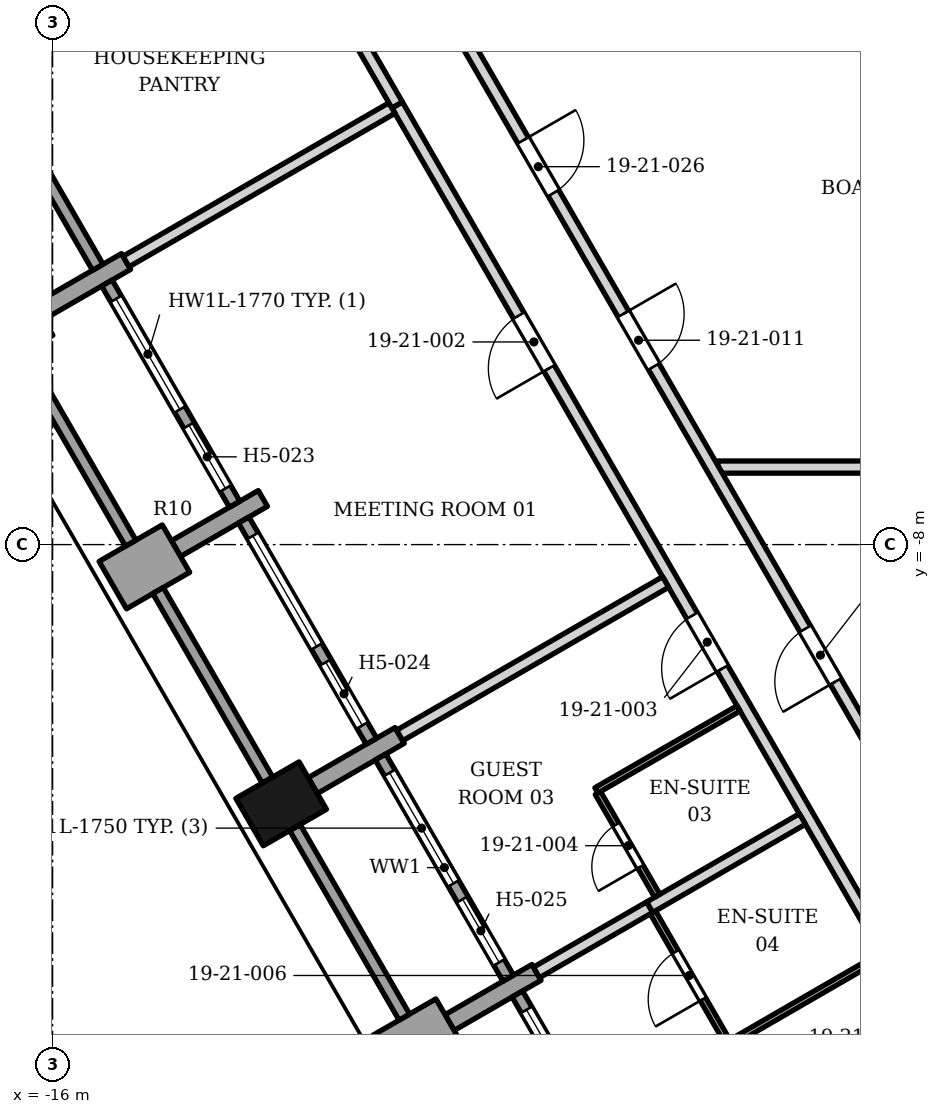
"""IFC4 building model, lengths in metres.
Left out: names, types, materials, properties, quantities, classifications, styles, units other than length and angle.
Written with IfcOpenShell. Run it as: python <this file> out.ifc"""

import sys

from ifc_helpers import new_model, si_unit, direction, frame, frame_2d, origin, origin_2d, place, context, subcontext, project, spatial, rectangle, extrude, element, fill, save


model = new_model("IFC4")
c1 = context("Model", 3, precision=1e-05, world=origin(), true_north=direction((0.0, 1.0)))
c2 = subcontext(c1, "Body", "Model", "MODEL_VIEW")
j1 = project(units=[si_unit("LENGTHUNIT", "METRE"), si_unit("PLANEANGLEUNIT", "RADIAN")], contexts=[c1])
p1 = place(None, origin())
s1 = spatial("IfcSite", under=j1, at=p1, CompositionType="ELEMENT")
p2 = place(p1, origin())
s2 = spatial("IfcBuilding", under=s1, at=p2, CompositionType="ELEMENT")
p3 = place(p2, frame((0.0, 0.0, 91.8)))
s3 = spatial("IfcBuildingStorey", under=s2, at=p3, CompositionType="ELEMENT", Elevation=91.8)
for number, where, z_axis, x_axis in (
    (1, (-16.741, -4.469, 0.0), (0.0, 0.0, 1.0), (0.5, -0.866, 0.0)),
    (2, (-12.241, -12.263, 0.0), (0.0, 0.0, 1.0), (0.5, -0.866, 0.0)),
):
    element("IfcColumn", number, at=place(p3, frame(where, z_axis=z_axis, x_axis=x_axis)), inside=s3, PredefinedType="COLUMN", context=c2, shape_type="SweptSolid", body=[
        extrude(rectangle(XDim=0.9, YDim=1.2, at=origin_2d()), origin(), (0.0, 0.0, 1.0), 3.4),
    ])
p4 = place(p3, frame((-16.221, -4.169, 0.0), z_axis=(0.0, 0.0, 1.0), x_axis=(0.865976140824, 0.500085316245, 0.0)))
e3 = element("IfcWall", 3, at=p4, inside=s3, PredefinedType="SOLIDWALL", context=c2, shape_type="SweptSolid", body=[
    extrude(rectangle(XDim=1.65, YDim=0.3, at=frame_2d((0.825, 0.0))), origin(), (0.0, 0.0, 1.0), 2.65),
])
p5 = place(p3, frame((-13.971, -8.066, 0.0), z_axis=(0.0, 0.0, 1.0), x_axis=(-0.865955154139, -0.50012165622, 0.0)))
e4 = element("IfcWall", 4, at=p5, inside=s3, PredefinedType="SOLIDWALL", context=c2, shape_type="SweptSolid", body=[
    extrude(rectangle(XDim=1.2, YDim=0.9, at=frame_2d((0.6, 0.0))), origin(), (0.0, 0.0, 1.0), 2.63),
])
p6 = place(p3, frame((-13.971, -8.066, 0.0), z_axis=(0.0, 0.0, 1.0), x_axis=(0.866040211805, 0.499974350878, 0.0)))
e5 = element("IfcWall", 5, at=p6, inside=s3, PredefinedType="SOLIDWALL", context=c2, shape_type="SweptSolid", body=[
    extrude(rectangle(XDim=1.65, YDim=0.3, at=frame_2d((0.825, 0.0))), origin(), (0.0, 0.0, 1.0), 2.473),
])
p7 = place(p3, frame((-11.721, -11.963, 0.0), z_axis=(0.0, 0.0, 1.0), x_axis=(0.866040211805, 0.499974350878, 0.0)))
e6 = element("IfcWall", 6, at=p7, inside=s3, PredefinedType="SOLIDWALL", context=c2, shape_type="SweptSolid", body=[
    extrude(rectangle(XDim=1.65, YDim=0.3, at=frame_2d((0.825, 0.0))), origin(), (0.0, 0.0, 1.0), 2.45),
])
p8 = place(p3, frame((-10.51, -16.46, 0.0), z_axis=(0.0, 0.0, 1.0), x_axis=(0.865955154139, 0.50012165622, 0.0)))
e7 = element("IfcWall", 7, at=p8, inside=s3, PredefinedType="SOLIDWALL", context=c2, shape_type="SweptSolid", body=[
    extrude(rectangle(XDim=1.2, YDim=0.9, at=frame_2d((0.6, 0.0))), origin(), (0.0, 0.0, 1.0), 2.63),
])
p9 = place(p3, frame((-8.042, -15.035, 0.0), z_axis=(0.0, 0.0, 1.0), x_axis=(-0.866040211805, -0.499974350878, 0.0)))
e8 = element("IfcWall", 8, at=p9, inside=s3, PredefinedType="SOLIDWALL", context=c2, shape_type="SweptSolid", body=[
    extrude(rectangle(XDim=1.65, YDim=0.3, at=frame_2d((0.825, 0.0))), origin(), (0.0, 0.0, 1.0), 2.65),
])
p10 = place(p3, frame((-17.357, 0.198, 0.0), z_axis=(0.0, 0.0, 1.0), x_axis=(0.500027713859, -0.866009402589, 0.0)))
e9 = element("IfcWall", 9, at=p10, inside=s3, PredefinedType="ELEMENTEDWALL", context=c2, shape_type="SweptSolid", body=[
    extrude(rectangle(XDim=4.2, YDim=0.2, at=frame_2d((2.1, 0.0))), origin(), (0.0, 0.0, 1.0), 2.65),
])
p11 = place(p3, frame((-16.516, -4.859, 0.0), z_axis=(0.0, 0.0, 1.0), x_axis=(0.499961193289, -0.866047807691, 0.0)))
e10 = element("IfcWall", 10, at=p11, inside=s3, PredefinedType="SOLIDWALL", context=c2, shape_type="SweptSolid", body=[
    extrude(rectangle(XDim=3.6, YDim=0.2, at=frame_2d((1.8, 0.0))), origin(), (0.0, 0.0, 1.0), 2.63),
])
p12 = place(p3, frame((-15.107, -3.699, 0.0), z_axis=(0.0, 0.0, 1.0), x_axis=(0.500002543286, -0.866023935413, 0.0)))
e11 = element("IfcWall", 11, at=p12, inside=s3, PredefinedType="ELEMENTEDWALL", context=c2, shape_type="SweptSolid", body=[
    extrude(rectangle(XDim=4.2, YDim=0.2, at=frame_2d((2.1, 0.0))), origin(), (0.0, 0.0, 1.0), 2.473),
])
p13 = place(p12, frame((0.3, 0.0, 0.6)))
e12 = element("IfcOpeningElement", 12, at=p13, cuts=e11, PredefinedType="OPENING", context=c2, shape_type="SweptSolid", body=[
    extrude(rectangle(XDim=2.1, YDim=1.77, at=frame_2d((1.05, 0.885))), frame((0.0, 0.11, 0.0), z_axis=(0.0, -1.0, 0.0), x_axis=(1.0, 0.0, 0.0)), (0.0, 0.0, 1.0), 0.22),
])
p14 = place(p12, frame((2.7, 0.0, 0.0)))
e13 = element("IfcOpeningElement", 13, at=p14, cuts=e11, PredefinedType="OPENING", context=c2, shape_type="SweptSolid", body=[
    extrude(rectangle(XDim=1.2, YDim=2.37, at=frame_2d((0.6, 1.185))), frame((0.0, 0.11, 0.0), z_axis=(0.0, -1.0, 0.0), x_axis=(1.0, 0.0, 0.0)), (0.0, 0.0, 1.0), 0.22),
])
p15 = place(p3, frame((-14.266, -8.756, 0.0), z_axis=(0.0, 0.0, 1.0), x_axis=(0.499961193289, -0.866047807691, 0.0)))
e14 = element("IfcWall", 14, at=p15, inside=s3, PredefinedType="SOLIDWALL", context=c2, shape_type="SweptSolid", body=[
    extrude(rectangle(XDim=3.6, YDim=0.2, at=frame_2d((1.8, 0.0))), origin(), (0.0, 0.0, 1.0), 2.473),
])
p16 = place(p3, frame((-12.857, -7.596, 0.0), z_axis=(0.0, 0.0, 1.0), x_axis=(0.500027713859, -0.866009402589, 0.0)))
e15 = element("IfcWall", 15, at=p16, inside=s3, PredefinedType="ELEMENTEDWALL", context=c2, shape_type="SweptSolid", body=[
    extrude(rectangle(XDim=4.2, YDim=0.2, at=frame_2d((2.1, 0.0))), origin(), (0.0, 0.0, 1.0), 2.65),
])
p17 = place(p16, frame((0.3, 0.0, 0.6)))
e16 = element("IfcOpeningElement", 16, at=p17, cuts=e15, PredefinedType="OPENING", context=c2, shape_type="SweptSolid", body=[
    extrude(rectangle(XDim=2.1, YDim=1.8, at=frame_2d((1.05, 0.9))), frame((0.0, 0.11, 0.0), z_axis=(0.0, -1.0, 0.0), x_axis=(1.0, 0.0, 0.0)), (0.0, 0.0, 1.0), 0.22),
])
p18 = place(p16, frame((2.7, 0.0, 0.0)))
e17 = element("IfcOpeningElement", 17, at=p18, cuts=e15, PredefinedType="OPENING", context=c2, shape_type="SweptSolid", body=[
    extrude(rectangle(XDim=1.2, YDim=2.4, at=frame_2d((0.6, 1.2))), frame((0.0, 0.11, 0.0), z_axis=(0.0, -1.0, 0.0), x_axis=(1.0, 0.0, 0.0)), (0.0, 0.0, 1.0), 0.22),
])
p19 = place(p3, frame((-12.016, -12.653, 0.0), z_axis=(0.0, 0.0, 1.0), x_axis=(0.499961193289, -0.866047807691, 0.0)))
e18 = element("IfcWall", 18, at=p19, inside=s3, PredefinedType="SOLIDWALL", context=c2, shape_type="SweptSolid", body=[
    extrude(rectangle(XDim=3.6, YDim=0.2, at=frame_2d((1.8, 0.0))), origin(), (0.0, 0.0, 1.0), 2.63),
])
p20 = place(p3, frame((-10.607, -11.493, 0.0), z_axis=(0.0, 0.0, 1.0), x_axis=(0.500002543286, -0.866023935413, 0.0)))
e19 = element("IfcWall", 19, at=p20, inside=s3, PredefinedType="ELEMENTEDWALL", context=c2, shape_type="SweptSolid", body=[
    extrude(rectangle(XDim=4.2, YDim=0.2, at=frame_2d((2.1, 0.0))), origin(), (0.0, 0.0, 1.0), 2.45),
])
p21 = place(p20, frame((0.3, 0.0, 0.6)))
e20 = element("IfcOpeningElement", 20, at=p21, cuts=e19, PredefinedType="OPENING", context=c2, shape_type="SweptSolid", body=[
    extrude(rectangle(XDim=2.1, YDim=1.75, at=frame_2d((1.05, 0.875))), frame((0.0, 0.11, 0.0), z_axis=(0.0, -1.0, 0.0), x_axis=(1.0, 0.0, 0.0)), (0.0, 0.0, 1.0), 0.22),
])
p22 = place(p20, frame((2.7, 0.0, 0.0)))
e21 = element("IfcOpeningElement", 21, at=p22, cuts=e19, PredefinedType="OPENING", context=c2, shape_type="SweptSolid", body=[
    extrude(rectangle(XDim=1.2, YDim=2.35, at=frame_2d((0.6, 1.175))), frame((0.0, 0.11, 0.0), z_axis=(0.0, -1.0, 0.0), x_axis=(1.0, 0.0, 0.0)), (0.0, 0.0, 1.0), 0.22),
])
p23 = place(p3, frame((-8.357, -15.39, 0.0), z_axis=(0.0, 0.0, 1.0), x_axis=(0.500027713859, -0.866009402589, 0.0)))
e22 = element("IfcWall", 22, at=p23, inside=s3, PredefinedType="ELEMENTEDWALL", context=c2, shape_type="SweptSolid", body=[
    extrude(rectangle(XDim=4.2, YDim=0.2, at=frame_2d((2.1, 0.0))), origin(), (0.0, 0.0, 1.0), 2.65),
])
p24 = place(p23, frame((0.3, 0.0, 0.6)))
e23 = element("IfcOpeningElement", 23, at=p24, cuts=e22, PredefinedType="OPENING", context=c2, shape_type="SweptSolid", body=[
    extrude(rectangle(XDim=2.1, YDim=1.8, at=frame_2d((1.05, 0.9))), frame((0.0, 0.11, 0.0), z_axis=(0.0, -1.0, 0.0), x_axis=(1.0, 0.0, 0.0)), (0.0, 0.0, 1.0), 0.22),
])
p25 = place(p23, frame((2.7, 0.0, 0.0)))
e24 = element("IfcOpeningElement", 24, at=p25, cuts=e22, PredefinedType="OPENING", context=c2, shape_type="SweptSolid", body=[
    extrude(rectangle(XDim=1.2, YDim=2.4, at=frame_2d((0.6, 1.2))), frame((0.0, 0.11, 0.0), z_axis=(0.0, -1.0, 0.0), x_axis=(1.0, 0.0, 0.0)), (0.0, 0.0, 1.0), 0.22),
])
p26 = place(p3, frame((-10.334, -0.77, 0.0), z_axis=(0.0, 0.0, 1.0), x_axis=(0.499996405163, -0.866027479255, 0.0)))
e25 = element("IfcWall", 25, at=p26, inside=s3, PredefinedType="PARTITIONING", context=c2, shape_type="SweptSolid", body=[
    extrude(rectangle(XDim=20.803, YDim=0.2, at=frame_2d((10.401, 0.0))), origin(), (0.0, 0.0, 1.0), 2.384),
])
p27 = place(p26, frame((4.0, 0.0, 0.0)))
e26 = element("IfcOpeningElement", 26, at=p27, cuts=e25, PredefinedType="OPENING", context=c2, shape_type="SweptSolid", body=[
    extrude(rectangle(XDim=1.0, YDim=2.1, at=frame_2d((0.5, 1.05))), frame((0.0, 0.11, 0.0), z_axis=(0.0, -1.0, 0.0), x_axis=(1.0, 0.0, 0.0)), (0.0, 0.0, 1.0), 0.22),
])
p28 = place(p26, frame((9.7, 0.0, 0.0)))
e27 = element("IfcOpeningElement", 27, at=p28, cuts=e25, PredefinedType="OPENING", context=c2, shape_type="SweptSolid", body=[
    extrude(rectangle(XDim=1.0, YDim=2.1, at=frame_2d((0.5, 1.05))), frame((0.0, 0.11, 0.0), z_axis=(0.0, -1.0, 0.0), x_axis=(1.0, 0.0, 0.0)), (0.0, 0.0, 1.0), 0.22),
])
p29 = place(p26, frame((16.6, 0.0, 0.0)))
e28 = element("IfcOpeningElement", 28, at=p29, cuts=e25, PredefinedType="OPENING", context=c2, shape_type="SweptSolid", body=[
    extrude(rectangle(XDim=1.1, YDim=2.1, at=frame_2d((0.55, 1.05))), frame((0.0, 0.11, 0.0), z_axis=(0.0, -1.0, 0.0), x_axis=(1.0, 0.0, 0.0)), (0.0, 0.0, 1.0), 0.22),
])
p30 = place(p26, frame((18.852, 0.0, 0.0)))
e29 = element("IfcOpeningElement", 29, at=p30, cuts=e25, PredefinedType="OPENING", context=c2, shape_type="SweptSolid", body=[
    extrude(rectangle(XDim=1.1, YDim=2.1, at=frame_2d((0.55, 1.05))), frame((0.0, 0.11, 0.0), z_axis=(0.0, -1.0, 0.0), x_axis=(1.0, 0.0, 0.0)), (0.0, 0.0, 1.0), 0.22),
])
p31 = place(p3, frame((-4.88, -16.212, 0.0), z_axis=(0.0, 0.0, 1.0), x_axis=(0.865729701078, 0.500511822708, 0.0)))
e30 = element("IfcWall", 30, at=p31, inside=s3, PredefinedType="PARTITIONING", context=c2, shape_type="SweptSolid", body=[
    extrude(rectangle(XDim=2.9, YDim=0.1, at=frame_2d((1.45, 0.0))), origin(), (0.0, 0.0, 1.0), 2.628),
])
p32 = place(p3, frame((-6.129, -14.046, 0.0), z_axis=(0.0, 0.0, 1.0), x_axis=(0.499408942836, -0.866366381974, 0.0)))
e31 = element("IfcWall", 31, at=p32, inside=s3, PredefinedType="PARTITIONING", context=c2, shape_type="SweptSolid", body=[
    extrude(rectangle(XDim=2.45, YDim=0.1, at=frame_2d((1.225, 0.0))), origin(), (0.0, 0.0, 1.0), 3.23),
])
p33 = place(p32, frame((0.75, 0.0, 0.0)))
e32 = element("IfcOpeningElement", 32, at=p33, cuts=e31, PredefinedType="OPENING", context=c2, shape_type="SweptSolid", body=[
    extrude(rectangle(XDim=0.9, YDim=2.1, at=frame_2d((0.45, 1.05))), frame((0.0, 0.06, 0.0), z_axis=(0.0, -1.0, 0.0), x_axis=(1.0, 0.0, 0.0)), (0.0, 0.0, 1.0), 0.12),
])
p34 = place(p3, frame((-8.042, -15.036, 0.0), z_axis=(0.0, 0.0, 1.0), x_axis=(0.866448284977, 0.499266831925, 0.0)))
e33 = element("IfcWall", 33, at=p34, inside=s3, PredefinedType="PARTITIONING", context=c2, shape_type="SweptSolid", body=[
    extrude(rectangle(XDim=2.15, YDim=0.2, at=frame_2d((1.075, 0.0))), origin(), (0.0, 0.0, 1.0), 3.23),
])
p35 = place(p3, frame((-6.179, -13.962, 0.0), z_axis=(0.0, 0.0, 1.0), x_axis=(0.866011727401, 0.500023687443, 0.0)))
e34 = element("IfcWall", 34, at=p35, inside=s3, PredefinedType="PARTITIONING", context=c2, shape_type="SweptSolid", body=[
    extrude(rectangle(XDim=2.9, YDim=0.2, at=frame_2d((1.45, 0.0))), origin(), (0.0, 0.0, 1.0), 2.628),
])
p36 = place(p3, frame((-7.032, -12.085, 0.0), z_axis=(0.0, 0.0, 1.0), x_axis=(0.500098182527, -0.865968710655, 0.0)))
e35 = element("IfcWall", 35, at=p36, inside=s3, PredefinedType="PARTITIONING", context=c2, shape_type="SweptSolid", body=[
    extrude(rectangle(XDim=1.95, YDim=0.1, at=frame_2d((0.975, 0.0))), origin(), (0.0, 0.0, 1.0), 2.45),
])
p37 = place(p36, frame((0.6, 0.0, 0.0)))
e36 = element("IfcOpeningElement", 36, at=p37, cuts=e35, PredefinedType="OPENING", context=c2, shape_type="SweptSolid", body=[
    extrude(rectangle(XDim=0.8, YDim=2.1, at=frame_2d((0.4, 1.05))), frame((0.0, 0.06, 0.0), z_axis=(0.0, -1.0, 0.0), x_axis=(1.0, 0.0, 0.0)), (0.0, 0.0, 1.0), 0.12),
])
p38 = place(p3, frame((-7.057, -12.042, 0.0), z_axis=(0.0, 0.0, 1.0), x_axis=(0.866339109022, 0.499456252518, 0.0)))
e37 = element("IfcWall", 37, at=p38, inside=s3, PredefinedType="PARTITIONING", context=c2, shape_type="SweptSolid", body=[
    extrude(rectangle(XDim=2.7, YDim=0.1, at=frame_2d((1.35, 0.0))), origin(), (0.0, 0.0, 1.0), 2.45),
])
p39 = place(p3, frame((-10.292, -11.138, 0.0), z_axis=(0.0, 0.0, 1.0), x_axis=(0.866188805601, 0.49971687289, 0.0)))
e38 = element("IfcWall", 38, at=p39, inside=s3, PredefinedType="PARTITIONING", context=c2, shape_type="SweptSolid", body=[
    extrude(rectangle(XDim=5.05, YDim=0.2, at=frame_2d((2.525, 0.0))), origin(), (0.0, 0.0, 1.0), 2.552),
])
p40 = place(p3, frame((-5.061, -6.725, 0.0), z_axis=(0.0, 0.0, 1.0), x_axis=(1.0, 0.0, 0.0)))
e39 = element("IfcWall", 39, at=p40, inside=s3, PredefinedType="PARTITIONING", context=c2, shape_type="SweptSolid", body=[
    extrude(rectangle(XDim=10.261, YDim=0.2, at=frame_2d((5.13, 0.0))), origin(), (0.0, 0.0, 1.0), 2.384),
])
p41 = place(p3, frame((-14.792, -3.344, 0.0), z_axis=(0.0, 0.0, 1.0), x_axis=(0.866188805601, 0.49971687289, 0.0)))
e40 = element("IfcWall", 40, at=p41, inside=s3, PredefinedType="PARTITIONING", context=c2, shape_type="SweptSolid", body=[
    extrude(rectangle(XDim=5.05, YDim=0.2, at=frame_2d((2.525, 0.0))), origin(), (0.0, 0.0, 1.0), 2.473),
])
p42 = place(p3, frame((-12.534, 3.04, 0.0), z_axis=(0.0, 0.0, 1.0), x_axis=(0.50001224981, -0.866018331238, 0.0)))
e41 = element("IfcWall", 41, at=p42, inside=s3, PredefinedType="PARTITIONING", context=c2, shape_type="SweptSolid", body=[
    extrude(rectangle(XDim=4.4, YDim=0.2, at=frame_2d((2.2, 0.0))), origin(), (0.0, 0.0, 1.0), 3.23),
])
p43 = place(p42, frame((1.7, 0.0, 0.0)))
e42 = element("IfcOpeningElement", 42, at=p43, cuts=e41, PredefinedType="OPENING", context=c2, shape_type="SweptSolid", body=[
    extrude(rectangle(XDim=0.9, YDim=2.1, at=frame_2d((0.45, 1.05))), frame((0.0, 0.11, 0.0), z_axis=(0.0, -1.0, 0.0), x_axis=(1.0, 0.0, 0.0)), (0.0, 0.0, 1.0), 0.22),
])
p44 = place(p3, frame((-11.18, 3.7, 0.0), z_axis=(0.0, 0.0, 1.0), x_axis=(0.500129162475, -0.865950818951, 0.0)))
e43 = element("IfcWall", 43, at=p44, inside=s3, PredefinedType="PARTITIONING", context=c2, shape_type="SweptSolid", body=[
    extrude(rectangle(XDim=22.499, YDim=0.2, at=frame_2d((11.249, 0.0))), origin(), (0.0, 0.0, 1.0), 2.384),
])
p45 = place(p44, frame((9.13, 0.0, 0.0)))
e44 = element("IfcOpeningElement", 44, at=p45, cuts=e43, PredefinedType="OPENING", context=c2, shape_type="SweptSolid", body=[
    extrude(rectangle(XDim=1.0, YDim=2.1, at=frame_2d((0.5, 1.05))), frame((0.0, 0.11, 0.0), z_axis=(0.0, -1.0, 0.0), x_axis=(1.0, 0.0, 0.0)), (0.0, 0.0, 1.0), 0.22),
])
p46 = place(p44, frame((15.111, 0.0, 0.0)))
e45 = element("IfcOpeningElement", 45, at=p46, cuts=e43, PredefinedType="OPENING", context=c2, shape_type="SweptSolid", body=[
    extrude(rectangle(XDim=1.0, YDim=2.1, at=frame_2d((0.5, 1.05))), frame((0.0, 0.11, 0.0), z_axis=(0.0, -1.0, 0.0), x_axis=(1.0, 0.0, 0.0)), (0.0, 0.0, 1.0), 0.22),
])
p47 = place(p44, frame((5.834, 0.0, 0.0)))
e46 = element("IfcOpeningElement", 46, at=p47, cuts=e43, PredefinedType="OPENING", context=c2, shape_type="SweptSolid", body=[
    extrude(rectangle(XDim=1.0, YDim=2.1, at=frame_2d((0.5, 1.05))), frame((0.0, 0.11, 0.0), z_axis=(0.0, -1.0, 0.0), x_axis=(1.0, 0.0, 0.0)), (0.0, 0.0, 1.0), 0.22),
])
p48 = place(p13, origin())
e47 = element("IfcWindow", 47, at=p48, inside=s3, PartitioningType="SINGLE_PANEL", PredefinedType="WINDOW", context=c2, shape_type="SweptSolid", body=[
    extrude(rectangle(XDim=2.1, YDim=1.77, at=frame_2d((1.05, 0.885))), frame((0.0, 0.03, 0.0), z_axis=(0.0, -1.0, 0.0), x_axis=(1.0, 0.0, 0.0)), (0.0, 0.0, 1.0), 0.06),
])
fill(e12, e47)
p49 = place(p14, origin())
e48 = element("IfcDoor", 48, at=p49, inside=s3, OperationType="SINGLE_SWING_LEFT", PredefinedType="DOOR", context=c2, shape_type="SweptSolid", body=[
    extrude(rectangle(XDim=1.2, YDim=2.37, at=frame_2d((0.6, 1.185))), frame((0.0, 0.025, 0.0), z_axis=(0.0, -1.0, 0.0), x_axis=(1.0, 0.0, 0.0)), (0.0, 0.0, 1.0), 0.05),
])
fill(e13, e48)
p50 = place(p17, origin())
e49 = element("IfcWindow", 49, at=p50, inside=s3, PartitioningType="SINGLE_PANEL", PredefinedType="WINDOW", context=c2, shape_type="SweptSolid", body=[
    extrude(rectangle(XDim=2.1, YDim=1.8, at=frame_2d((1.05, 0.9))), frame((0.0, 0.03, 0.0), z_axis=(0.0, -1.0, 0.0), x_axis=(1.0, 0.0, 0.0)), (0.0, 0.0, 1.0), 0.06),
])
fill(e16, e49)
p51 = place(p18, origin())
e50 = element("IfcDoor", 50, at=p51, inside=s3, OperationType="SINGLE_SWING_LEFT", PredefinedType="DOOR", context=c2, shape_type="SweptSolid", body=[
    extrude(rectangle(XDim=1.2, YDim=2.4, at=frame_2d((0.6, 1.2))), frame((0.0, 0.025, 0.0), z_axis=(0.0, -1.0, 0.0), x_axis=(1.0, 0.0, 0.0)), (0.0, 0.0, 1.0), 0.05),
])
fill(e17, e50)
p52 = place(p21, origin())
e51 = element("IfcWindow", 51, at=p52, inside=s3, PartitioningType="SINGLE_PANEL", PredefinedType="WINDOW", context=c2, shape_type="SweptSolid", body=[
    extrude(rectangle(XDim=2.1, YDim=1.75, at=frame_2d((1.05, 0.875))), frame((0.0, 0.03, 0.0), z_axis=(0.0, -1.0, 0.0), x_axis=(1.0, 0.0, 0.0)), (0.0, 0.0, 1.0), 0.06),
])
fill(e20, e51)
p53 = place(p22, origin())
e52 = element("IfcDoor", 52, at=p53, inside=s3, OperationType="SINGLE_SWING_LEFT", PredefinedType="DOOR", context=c2, shape_type="SweptSolid", body=[
    extrude(rectangle(XDim=1.2, YDim=2.35, at=frame_2d((0.6, 1.175))), frame((0.0, 0.025, 0.0), z_axis=(0.0, -1.0, 0.0), x_axis=(1.0, 0.0, 0.0)), (0.0, 0.0, 1.0), 0.05),
])
fill(e21, e52)
p54 = place(p24, origin())
e53 = element("IfcWindow", 53, at=p54, inside=s3, PartitioningType="SINGLE_PANEL", PredefinedType="WINDOW", context=c2, shape_type="SweptSolid", body=[
    extrude(rectangle(XDim=2.1, YDim=1.8, at=frame_2d((1.05, 0.9))), frame((0.0, 0.03, 0.0), z_axis=(0.0, -1.0, 0.0), x_axis=(1.0, 0.0, 0.0)), (0.0, 0.0, 1.0), 0.06),
])
fill(e23, e53)
p55 = place(p27, origin())
e54 = element("IfcDoor", 54, at=p55, inside=s3, OperationType="SINGLE_SWING_RIGHT", PredefinedType="DOOR", context=c2, shape_type="SweptSolid", body=[
    extrude(rectangle(XDim=1.0, YDim=2.1, at=frame_2d((0.5, 1.05))), frame((0.0, 0.025, 0.0), z_axis=(0.0, -1.0, 0.0), x_axis=(1.0, 0.0, 0.0)), (0.0, 0.0, 1.0), 0.05),
])
fill(e26, e54)
p56 = place(p28, origin())
e55 = element("IfcDoor", 55, at=p56, inside=s3, OperationType="SINGLE_SWING_RIGHT", PredefinedType="DOOR", context=c2, shape_type="SweptSolid", body=[
    extrude(rectangle(XDim=1.0, YDim=2.1, at=frame_2d((0.5, 1.05))), frame((0.0, 0.025, 0.0), z_axis=(0.0, -1.0, 0.0), x_axis=(1.0, 0.0, 0.0)), (0.0, 0.0, 1.0), 0.05),
])
fill(e27, e55)
p57 = place(p37, origin())
e56 = element("IfcDoor", 56, at=p57, inside=s3, OperationType="SINGLE_SWING_RIGHT", PredefinedType="DOOR", context=c2, shape_type="SweptSolid", body=[
    extrude(rectangle(XDim=0.8, YDim=2.1, at=frame_2d((0.4, 1.05))), frame((0.0, 0.025, 0.0), z_axis=(0.0, -1.0, 0.0), x_axis=(1.0, 0.0, 0.0)), (0.0, 0.0, 1.0), 0.05),
])
fill(e36, e56)
p58 = place(p33, origin())
e57 = element("IfcDoor", 57, at=p58, inside=s3, OperationType="SINGLE_SWING_RIGHT", PredefinedType="DOOR", context=c2, shape_type="SweptSolid", body=[
    extrude(rectangle(XDim=0.9, YDim=2.1, at=frame_2d((0.45, 1.05))), frame((0.0, 0.025, 0.0), z_axis=(0.0, -1.0, 0.0), x_axis=(1.0, 0.0, 0.0)), (0.0, 0.0, 1.0), 0.05),
])
fill(e32, e57)
p59 = place(p45, origin())
e58 = element("IfcDoor", 58, at=p59, inside=s3, OperationType="SINGLE_SWING_LEFT", PredefinedType="DOOR", context=c2, shape_type="SweptSolid", body=[
    extrude(rectangle(XDim=1.0, YDim=2.1, at=frame_2d((0.5, 1.05))), frame((0.0, 0.025, 0.0), z_axis=(0.0, -1.0, 0.0), x_axis=(1.0, 0.0, 0.0)), (0.0, 0.0, 1.0), 0.05),
])
fill(e44, e58)
p60 = place(p46, origin())
e59 = element("IfcDoor", 59, at=p60, inside=s3, OperationType="SINGLE_SWING_RIGHT", PredefinedType="DOOR", context=c2, shape_type="SweptSolid", body=[
    extrude(rectangle(XDim=1.0, YDim=2.1, at=frame_2d((0.5, 1.05))), frame((0.0, 0.025, 0.0), z_axis=(0.0, -1.0, 0.0), x_axis=(1.0, 0.0, 0.0)), (0.0, 0.0, 1.0), 0.05),
])
fill(e45, e59)
p61 = place(p47, origin())
e60 = element("IfcDoor", 60, at=p61, inside=s3, OperationType="SINGLE_SWING_LEFT", PredefinedType="DOOR", context=c2, shape_type="SweptSolid", body=[
    extrude(rectangle(XDim=1.0, YDim=2.1, at=frame_2d((0.5, 1.05))), frame((0.0, 0.025, 0.0), z_axis=(0.0, -1.0, 0.0), x_axis=(1.0, 0.0, 0.0)), (0.0, 0.0, 1.0), 0.05),
])
fill(e46, e60)
save(model, sys.argv[1])
